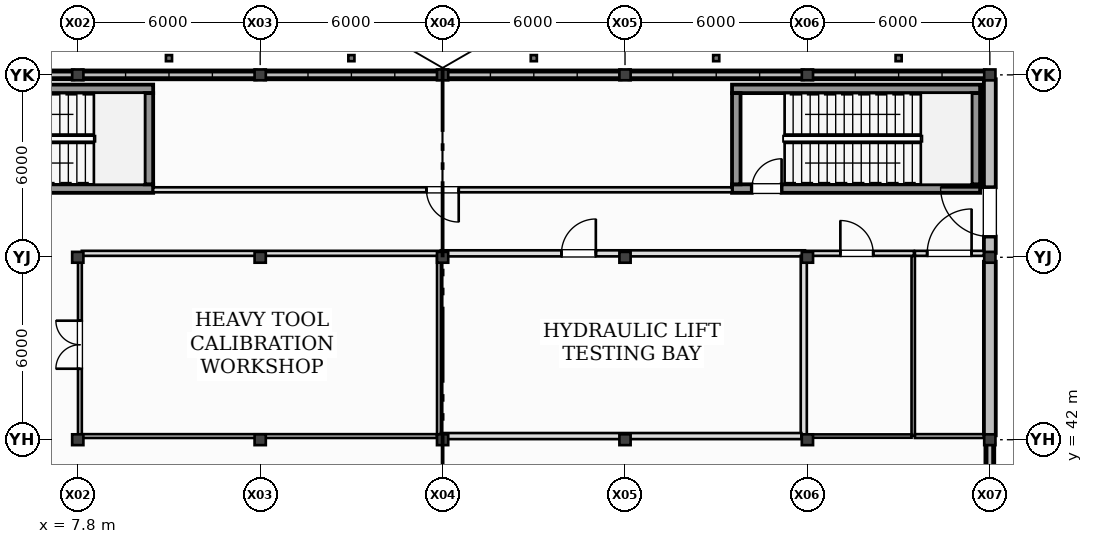
"""IFC4 building model, lengths in metres.
Left out: names, types, materials, properties, quantities, classifications, styles, units other than length and angle.
Written with IfcOpenShell. Run it as: python <this file> out.ifc"""

import sys

from ifc_helpers import new_model, si_unit, direction, frame, frame_2d, origin, origin_2d, place, context, subcontext, project, spatial, rectangle, hollow_rectangle, i_section, extrude, element, fill, save


model = new_model("IFC4")
c1 = context("Model", 3, precision=1e-05, world=origin(), true_north=direction((0.0, 1.0)))
c2 = subcontext(c1, "Body", "Model", "MODEL_VIEW")
j1 = project(units=[si_unit("LENGTHUNIT", "METRE"), si_unit("PLANEANGLEUNIT", "RADIAN")], contexts=[c1])
p1 = place(None, origin())
s1 = spatial("IfcSite", under=j1, at=p1, CompositionType="ELEMENT")
p2 = place(p1, origin())
s2 = spatial("IfcBuilding", under=s1, at=p2, CompositionType="ELEMENT")
p3 = place(p2, origin())
s3 = spatial("IfcBuildingStorey", under=s2, at=p3, CompositionType="ELEMENT", Elevation=0.0)
for number, where, z_axis, x_axis in (
    (1, (7.8, 42.0, -0.41), (0.0, 0.0, 1.0), (1.0, 0.0, 0.0)),
    (2, (7.8, 48.0, -0.41), (0.0, 0.0, 1.0), (1.0, 0.0, 0.0)),
    (3, (7.8, 54.0, -0.41), (0.0, 0.0, 1.0), (1.0, 0.0, 0.0)),
    (4, (13.8, 42.0, -0.41), (0.0, 0.0, 1.0), (1.0, 0.0, 0.0)),
    (5, (13.8, 48.0, -0.41), (0.0, 0.0, 1.0), (1.0, 0.0, 0.0)),
    (6, (13.8, 54.0, -0.41), (0.0, 0.0, 1.0), (1.0, 0.0, 0.0)),
    (7, (19.8, 42.0, -0.41), (0.0, 0.0, 1.0), (1.0, 0.0, 0.0)),
    (8, (19.8, 48.0, -0.41), (0.0, 0.0, 1.0), (1.0, 0.0, 0.0)),
    (9, (19.8, 54.0, -0.41), (0.0, 0.0, 1.0), (1.0, 0.0, 0.0)),
    (10, (25.8, 42.0, -0.41), (0.0, 0.0, 1.0), (1.0, 0.0, 0.0)),
    (11, (25.8, 48.0, -0.41), (0.0, 0.0, 1.0), (1.0, 0.0, 0.0)),
    (12, (25.8, 54.0, -0.41), (0.0, 0.0, 1.0), (1.0, 0.0, 0.0)),
    (13, (31.8, 42.0, -0.41), (0.0, 0.0, 1.0), (1.0, 0.0, 0.0)),
    (14, (31.8, 48.0, -0.41), (0.0, 0.0, 1.0), (1.0, 0.0, 0.0)),
    (15, (31.8, 54.0, -0.41), (0.0, 0.0, 1.0), (1.0, 0.0, 0.0)),
    (16, (37.8, 42.0, -0.41), (0.0, 0.0, 1.0), (1.0, 0.0, 0.0)),
    (17, (37.8, 48.0, -0.41), (0.0, 0.0, 1.0), (1.0, 0.0, 0.0)),
    (18, (37.8, 54.0, -0.41), (0.0, 0.0, 1.0), (1.0, 0.0, 0.0)),
):
    element("IfcColumn", number, at=place(p3, frame(where, z_axis=z_axis, x_axis=x_axis)), inside=s3, PredefinedType="COLUMN", context=c2, shape_type="SweptSolid", body=[
        extrude(i_section(OverallWidth=0.369, OverallDepth=0.356, WebThickness=0.011, FlangeThickness=0.018, at=origin_2d()), origin(), (0.0, 0.0, 1.0), 6.41),
    ])
for number, where, z_axis, x_axis in (
    (19, (10.8, 54.55, -0.35), (0.0, 0.0, 1.0), (1.0, 0.0, 0.0)),
    (20, (16.8, 54.55, -0.35), (0.0, 0.0, 1.0), (1.0, 0.0, 0.0)),
    (21, (22.8, 54.55, -0.35), (0.0, 0.0, 1.0), (1.0, 0.0, 0.0)),
    (22, (28.8, 54.55, -0.35), (0.0, 0.0, 1.0), (1.0, 0.0, 0.0)),
    (23, (34.8, 54.55, -0.35), (0.0, 0.0, 1.0), (1.0, 0.0, 0.0)),
):
    element("IfcColumn", number, at=place(p3, frame(where, z_axis=z_axis, x_axis=x_axis)), inside=s3, PredefinedType="PILASTER", context=c2, shape_type="SweptSolid", body=[
        extrude(hollow_rectangle(XDim=0.2, YDim=0.2, WallThickness=0.01, at=origin_2d()), origin(), (0.0, 0.0, 1.0), 6.35),
    ])
p4 = place(p3, frame((7.655, 54.0, 0.0), z_axis=(0.0, 0.0, 1.0), x_axis=(-1.0, 0.0, 0.0)))
e24 = element("IfcWall", 24, at=p4, inside=s3, PredefinedType="STANDARD", context=c2, shape_type="SweptSolid", body=[
    extrude(rectangle(XDim=5.71, YDim=0.29, at=frame_2d((2.855, 0.0))), origin(), (0.0, 0.0, 1.0), 0.92),
])
p5 = place(p3, frame((13.655, 54.0, 0.0), z_axis=(0.0, 0.0, 1.0), x_axis=(-1.0, 0.0, 0.0)))
e25 = element("IfcWall", 25, at=p5, inside=s3, PredefinedType="STANDARD", context=c2, shape_type="SweptSolid", body=[
    extrude(rectangle(XDim=5.71, YDim=0.29, at=frame_2d((2.855, 0.0))), origin(), (0.0, 0.0, 1.0), 0.32),
])
p6 = place(p3, frame((19.655, 54.0, 0.0), z_axis=(0.0, 0.0, 1.0), x_axis=(-1.0, 0.0, 0.0)))
e26 = element("IfcWall", 26, at=p6, inside=s3, PredefinedType="STANDARD", context=c2, shape_type="SweptSolid", body=[
    extrude(rectangle(XDim=5.71, YDim=0.29, at=frame_2d((2.855, 0.0))), origin(), (0.0, 0.0, 1.0), 0.44),
])
p7 = place(p3, frame((25.655, 54.0, 0.0), z_axis=(0.0, 0.0, 1.0), x_axis=(-1.0, 0.0, 0.0)))
e27 = element("IfcWall", 27, at=p7, inside=s3, PredefinedType="STANDARD", context=c2, shape_type="SweptSolid", body=[
    extrude(rectangle(XDim=5.71, YDim=0.29, at=frame_2d((2.855, 0.0))), origin(), (0.0, 0.0, 1.0), 0.56),
])
p8 = place(p3, frame((31.655, 54.0, 0.0), z_axis=(0.0, 0.0, 1.0), x_axis=(-1.0, 0.0, 0.0)))
e28 = element("IfcWall", 28, at=p8, inside=s3, PredefinedType="STANDARD", context=c2, shape_type="SweptSolid", body=[
    extrude(rectangle(XDim=5.71, YDim=0.29, at=frame_2d((2.855, 0.0))), origin(), (0.0, 0.0, 1.0), 0.68),
])
p9 = place(p3, frame((37.655, 54.0, 0.0), z_axis=(0.0, 0.0, 1.0), x_axis=(-1.0, 0.0, 0.0)))
e29 = element("IfcWall", 29, at=p9, inside=s3, PredefinedType="STANDARD", context=c2, shape_type="SweptSolid", body=[
    extrude(rectangle(XDim=5.71, YDim=0.29, at=frame_2d((2.855, 0.0))), origin(), (0.0, 0.0, 1.0), 0.8),
])
p10 = place(p3, frame((37.8, 36.145, 0.0), z_axis=(0.0, 0.0, 1.0), x_axis=(0.0, 1.0, 0.0)))
e30 = element("IfcWall", 30, at=p10, inside=s3, PredefinedType="STANDARD", context=c2, shape_type="SweptSolid", body=[
    extrude(rectangle(XDim=5.71, YDim=0.29, at=frame_2d((2.855, 0.0))), origin(), (0.0, 0.0, 1.0), 0.56),
])
p11 = place(p3, frame((37.8, 42.145, 0.0), z_axis=(0.0, 0.0, 1.0), x_axis=(0.0, 1.0, 0.0)))
e31 = element("IfcWall", 31, at=p11, inside=s3, PredefinedType="STANDARD", context=c2, shape_type="SweptSolid", body=[
    extrude(rectangle(XDim=5.71, YDim=0.39, at=frame_2d((2.855, 0.0))), origin(), (0.0, 0.0, 1.0), 5.044),
])
p12 = place(p3, frame((37.8, 48.145, 0.0), z_axis=(0.0, 0.0, 1.0), x_axis=(0.0, 1.0, 0.0)))
e32 = element("IfcWall", 32, at=p12, inside=s3, PredefinedType="STANDARD", context=c2, shape_type="SweptSolid", body=[
    extrude(rectangle(XDim=5.71, YDim=0.39, at=frame_2d((2.855, 0.0))), origin(), (0.0, 0.0, 1.0), 5.044),
])
p13 = place(p12, frame((0.537, 0.0, 0.0)))
e33 = element("IfcOpeningElement", 33, at=p13, cuts=e32, PredefinedType="OPENING", context=c2, shape_type="SweptSolid", body=[
    extrude(rectangle(XDim=1.62, YDim=2.2, at=frame_2d((0.81, 1.1))), frame((0.0, 0.205, 0.0), z_axis=(0.0, -1.0, 0.0), x_axis=(1.0, 0.0, 0.0)), (0.0, 0.0, 1.0), 0.41),
])
p14 = place(p3, frame((2.12, 50.26, 0.0), z_axis=(0.0, 0.0, 1.0), x_axis=(1.0, 0.0, 0.0)))
e34 = element("IfcWall", 34, at=p14, inside=s3, PredefinedType="SHEAR", context=c2, shape_type="SweptSolid", body=[
    extrude(rectangle(XDim=8.16, YDim=0.28, at=frame_2d((4.08, 0.0))), origin(), (0.0, 0.0, 1.0), 6.0),
])
p15 = place(p14, frame((0.65, 0.0, 0.0)))
e35 = element("IfcOpeningElement", 35, at=p15, cuts=e34, PredefinedType="OPENING", context=c2, shape_type="SweptSolid", body=[
    extrude(rectangle(XDim=0.98, YDim=2.15, at=frame_2d((0.49, 1.075))), frame((0.0, 0.15, 0.0), z_axis=(0.0, -1.0, 0.0), x_axis=(1.0, 0.0, 0.0)), (0.0, 0.0, 1.0), 0.3),
])
p16 = place(p3, frame((10.28, 53.54, 0.0), z_axis=(0.0, 0.0, 1.0), x_axis=(-1.0, 0.0, 0.0)))
e36 = element("IfcWall", 36, at=p16, inside=s3, PredefinedType="SHEAR", context=c2, shape_type="SweptSolid", body=[
    extrude(rectangle(XDim=8.16, YDim=0.28, at=frame_2d((4.08, 0.0))), origin(), (0.0, 0.0, 1.0), 6.0),
])
p17 = place(p3, frame((10.14, 50.4, 0.0), z_axis=(0.0, 0.0, 1.0), x_axis=(0.0, 1.0, 0.0)))
e37 = element("IfcWall", 37, at=p17, inside=s3, PredefinedType="SHEAR", context=c2, shape_type="SweptSolid", body=[
    extrude(rectangle(XDim=3.0, YDim=0.28, at=frame_2d((1.5, 0.0))), origin(), (0.0, 0.0, 1.0), 6.0),
])
p18 = place(p3, frame((29.32, 50.26, 0.0), z_axis=(0.0, 0.0, 1.0), x_axis=(1.0, 0.0, 0.0)))
e38 = element("IfcWall", 38, at=p18, inside=s3, PredefinedType="SHEAR", context=c2, shape_type="SweptSolid", body=[
    extrude(rectangle(XDim=8.16, YDim=0.28, at=frame_2d((4.08, 0.0))), origin(), (0.0, 0.0, 1.0), 6.0),
])
p19 = place(p18, frame((0.65, 0.0, 0.0)))
e39 = element("IfcOpeningElement", 39, at=p19, cuts=e38, PredefinedType="OPENING", context=c2, shape_type="SweptSolid", body=[
    extrude(rectangle(XDim=0.98, YDim=2.15, at=frame_2d((0.49, 1.075))), frame((0.0, 0.15, 0.0), z_axis=(0.0, -1.0, 0.0), x_axis=(1.0, 0.0, 0.0)), (0.0, 0.0, 1.0), 0.3),
])
p20 = place(p3, frame((37.48, 53.54, 0.0), z_axis=(0.0, 0.0, 1.0), x_axis=(-1.0, 0.0, 0.0)))
e40 = element("IfcWall", 40, at=p20, inside=s3, PredefinedType="SHEAR", context=c2, shape_type="SweptSolid", body=[
    extrude(rectangle(XDim=8.16, YDim=0.28, at=frame_2d((4.08, 0.0))), origin(), (0.0, 0.0, 1.0), 6.0),
])
for number, where, z_axis, x_axis in (
    (41, (29.46, 53.4, 0.0), (0.0, 0.0, 1.0), (0.0, -1.0, 0.0)),
    (42, (37.34, 50.4, 0.0), (0.0, 0.0, 1.0), (0.0, 1.0, 0.0)),
):
    element("IfcWall", number, at=place(p3, frame(where, z_axis=z_axis, x_axis=x_axis)), inside=s3, PredefinedType="SHEAR", context=c2, shape_type="SweptSolid", body=[
        extrude(rectangle(XDim=3.0, YDim=0.28, at=frame_2d((1.5, 0.0))), origin(), (0.0, 0.0, 1.0), 6.0),
    ])
p21 = place(p3, frame((7.87, 42.117, 0.0), z_axis=(0.0, 0.0, 1.0), x_axis=(0.0, 1.0, 0.0)))
e43 = element("IfcWall", 43, at=p21, inside=s3, PredefinedType="PARTITIONING", context=c2, shape_type="SweptSolid", body=[
    extrude(rectangle(XDim=6.015, YDim=0.125, at=frame_2d((3.008, 0.0))), origin(), (0.0, 0.0, 1.0), 5.044),
])
p22 = place(p21, frame((2.218, 0.0, 0.0)))
e44 = element("IfcOpeningElement", 44, at=p22, cuts=e43, PredefinedType="OPENING", context=c2, shape_type="SweptSolid", body=[
    extrude(rectangle(XDim=1.58, YDim=2.2, at=frame_2d((0.79, 1.1))), frame((0.0, 0.073, 0.0), z_axis=(0.0, -1.0, 0.0), x_axis=(1.0, 0.0, 0.0)), (0.0, 0.0, 1.0), 0.145),
])
p23 = place(p3, frame((7.933, 48.13, 0.0), z_axis=(0.0, 0.0, 1.0), x_axis=(1.0, 0.0, 0.0)))
e45 = element("IfcWall", 45, at=p23, inside=s3, PredefinedType="PARTITIONING", context=c2, shape_type="SweptSolid", body=[
    extrude(rectangle(XDim=11.77, YDim=0.165, at=frame_2d((5.885, 0.0))), origin(), (0.0, 0.0, 1.0), 5.113),
])
p24 = place(p3, frame((19.68, 48.05, 0.0), z_axis=(0.0, 0.0, 1.0), x_axis=(0.0, -1.0, 0.0)))
e46 = element("IfcWall", 46, at=p24, inside=s3, PredefinedType="PARTITIONING", context=c2, shape_type="SweptSolid", body=[
    extrude(rectangle(XDim=5.933, YDim=0.125, at=frame_2d((2.966, 0.0))), origin(), (0.0, 0.0, 1.0), 5.044),
])
p25 = place(p3, frame((19.617, 42.12, 0.0), z_axis=(0.0, 0.0, 1.0), x_axis=(-1.0, 0.0, 0.0)))
e47 = element("IfcWall", 47, at=p25, inside=s3, PredefinedType="PARTITIONING", context=c2, shape_type="SweptSolid", body=[
    extrude(rectangle(XDim=11.685, YDim=0.125, at=frame_2d((5.842, 0.0))), origin(), (0.0, 0.0, 1.0), 5.113),
])
p26 = place(p3, frame((19.742, 48.13, 0.0), z_axis=(0.0, 0.0, 1.0), x_axis=(1.0, 0.0, 0.0)))
e48 = element("IfcWall", 48, at=p26, inside=s3, PredefinedType="PARTITIONING", context=c2, shape_type="SweptSolid", body=[
    extrude(rectangle(XDim=11.978, YDim=0.2, at=frame_2d((5.989, 0.0))), origin(), (0.0, 0.0, 1.0), 5.113),
])
p27 = place(p26, frame((3.968, 0.0, 0.0)))
e49 = element("IfcOpeningElement", 49, at=p27, cuts=e48, PredefinedType="OPENING", context=c2, shape_type="SweptSolid", body=[
    extrude(rectangle(XDim=1.13, YDim=2.18, at=frame_2d((0.565, 1.09))), frame((0.0, 0.11, 0.0), z_axis=(0.0, -1.0, 0.0), x_axis=(1.0, 0.0, 0.0)), (0.0, 0.0, 1.0), 0.22),
])
p28 = place(p3, frame((31.68, 48.05, 0.0), z_axis=(0.0, 0.0, 1.0), x_axis=(0.0, -1.0, 0.0)))
e50 = element("IfcWall", 50, at=p28, inside=s3, PredefinedType="PARTITIONING", context=c2, shape_type="SweptSolid", body=[
    extrude(rectangle(XDim=5.97, YDim=0.2, at=frame_2d((2.985, 0.0))), origin(), (0.0, 0.0, 1.0), 5.044),
])
p29 = place(p3, frame((31.6, 42.12, 0.0), z_axis=(0.0, 0.0, 1.0), x_axis=(-1.0, 0.0, 0.0)))
e51 = element("IfcWall", 51, at=p29, inside=s3, PredefinedType="PARTITIONING", context=c2, shape_type="SweptSolid", body=[
    extrude(rectangle(XDim=11.858, YDim=0.2, at=frame_2d((5.929, 0.0))), origin(), (0.0, 0.0, 1.0), 5.113),
])
p30 = place(p3, frame((31.78, 48.13, 0.0), z_axis=(0.0, 0.0, 1.0), x_axis=(1.0, 0.0, 0.0)))
e52 = element("IfcWall", 52, at=p30, inside=s3, PredefinedType="PARTITIONING", context=c2, shape_type="SweptSolid", body=[
    extrude(rectangle(XDim=3.522, YDim=0.165, at=frame_2d((1.761, 0.0))), origin(), (0.0, 0.0, 1.0), 5.113),
])
p31 = place(p30, frame((1.103, 0.0, 0.0)))
e53 = element("IfcOpeningElement", 53, at=p31, cuts=e52, PredefinedType="OPENING", context=c2, shape_type="SweptSolid", body=[
    extrude(rectangle(XDim=1.08, YDim=2.14, at=frame_2d((0.54, 1.07))), frame((0.0, 0.093, 0.0), z_axis=(0.0, -1.0, 0.0), x_axis=(1.0, 0.0, 0.0)), (0.0, 0.0, 1.0), 0.185),
])
p32 = place(p3, frame((35.28, 48.05, 0.0), z_axis=(0.0, 0.0, 1.0), x_axis=(0.0, -1.0, 0.0)))
e54 = element("IfcWall", 54, at=p32, inside=s3, PredefinedType="PARTITIONING", context=c2, shape_type="SweptSolid", body=[
    extrude(rectangle(XDim=5.925, YDim=0.11, at=frame_2d((2.962, 0.0))), origin(), (0.0, 0.0, 1.0), 5.68),
])
p33 = place(p3, frame((35.225, 42.12, 0.0), z_axis=(0.0, 0.0, 1.0), x_axis=(-1.0, 0.0, 0.0)))
e55 = element("IfcWall", 55, at=p33, inside=s3, PredefinedType="PARTITIONING", context=c2, shape_type="SweptSolid", body=[
    extrude(rectangle(XDim=3.445, YDim=0.11, at=frame_2d((1.723, 0.0))), origin(), (0.0, 0.0, 1.0), 5.113),
])
p34 = place(p3, frame((35.335, 48.13, 0.0), z_axis=(0.0, 0.0, 1.0), x_axis=(1.0, 0.0, 0.0)))
e56 = element("IfcWall", 56, at=p34, inside=s3, PredefinedType="PARTITIONING", context=c2, shape_type="SweptSolid", body=[
    extrude(rectangle(XDim=2.27, YDim=0.165, at=frame_2d((1.135, 0.0))), origin(), (0.0, 0.0, 1.0), 5.113),
])
p35 = place(p34, frame((0.405, 0.0, 0.0)))
e57 = element("IfcOpeningElement", 57, at=p35, cuts=e56, PredefinedType="OPENING", context=c2, shape_type="SweptSolid", body=[
    extrude(rectangle(XDim=1.46, YDim=2.3, at=frame_2d((0.73, 1.15))), frame((0.0, 0.093, 0.0), z_axis=(0.0, -1.0, 0.0), x_axis=(1.0, 0.0, 0.0)), (0.0, 0.0, 1.0), 0.185),
])
p36 = place(p3, frame((37.605, 42.12, 0.0), z_axis=(0.0, 0.0, 1.0), x_axis=(-1.0, 0.0, 0.0)))
e58 = element("IfcWall", 58, at=p36, inside=s3, PredefinedType="PARTITIONING", context=c2, shape_type="SweptSolid", body=[
    extrude(rectangle(XDim=2.27, YDim=0.125, at=frame_2d((1.135, 0.0))), origin(), (0.0, 0.0, 1.0), 5.113),
])
p37 = place(p3, frame((29.32, 50.22, 0.0), z_axis=(0.0, 0.0, 1.0), x_axis=(-1.0, 0.0, 0.0)))
e59 = element("IfcWall", 59, at=p37, inside=s3, PredefinedType="PARTITIONING", context=c2, shape_type="SweptSolid", body=[
    extrude(rectangle(XDim=19.04, YDim=0.165, at=frame_2d((9.52, 0.0))), origin(), (0.0, 0.0, 1.0), 5.68),
])
p38 = place(p37, frame((8.99, 0.0, 0.0)))
e60 = element("IfcOpeningElement", 60, at=p38, cuts=e59, PredefinedType="OPENING", context=c2, shape_type="SweptSolid", body=[
    extrude(rectangle(XDim=1.06, YDim=2.25, at=frame_2d((0.53, 1.125))), frame((0.0, 0.093, 0.0), z_axis=(0.0, -1.0, 0.0), x_axis=(1.0, 0.0, 0.0)), (0.0, 0.0, 1.0), 0.185),
])
p39 = place(p13, frame((1.62, 0.0, 0.0), z_axis=(0.0, 0.0, 1.0), x_axis=(-1.0, 0.0, 0.0)))
e61 = element("IfcDoor", 61, at=p39, inside=s3, OperationType="SINGLE_SWING_RIGHT", PredefinedType="DOOR", context=c2, shape_type="SweptSolid", body=[
    extrude(rectangle(XDim=1.62, YDim=2.2, at=frame_2d((0.81, 1.1))), frame((0.0, 0.025, 0.0), z_axis=(0.0, -1.0, 0.0), x_axis=(1.0, 0.0, 0.0)), (0.0, 0.0, 1.0), 0.05),
])
fill(e33, e61)
p40 = place(p19, origin())
e62 = element("IfcDoor", 62, at=p40, inside=s3, OperationType="SINGLE_SWING_RIGHT", PredefinedType="DOOR", context=c2, shape_type="SweptSolid", body=[
    extrude(rectangle(XDim=0.98, YDim=2.15, at=frame_2d((0.49, 1.075))), frame((0.0, 0.025, 0.0), z_axis=(0.0, -1.0, 0.0), x_axis=(1.0, 0.0, 0.0)), (0.0, 0.0, 1.0), 0.05),
])
fill(e39, e62)
p41 = place(p22, frame((1.58, 0.0, 0.0), z_axis=(0.0, 0.0, 1.0), x_axis=(-1.0, 0.0, 0.0)))
e63 = element("IfcDoor", 63, at=p41, inside=s3, OperationType="DOUBLE_DOOR_SINGLE_SWING", PredefinedType="DOOR", context=c2, shape_type="SweptSolid", body=[
    extrude(rectangle(XDim=1.58, YDim=2.2, at=frame_2d((0.79, 1.1))), frame((0.0, 0.025, 0.0), z_axis=(0.0, -1.0, 0.0), x_axis=(1.0, 0.0, 0.0)), (0.0, 0.0, 1.0), 0.05),
])
fill(e44, e63)
p42 = place(p27, frame((1.13, 0.0, 0.0), z_axis=(0.0, 0.0, 1.0), x_axis=(-1.0, 0.0, 0.0)))
e64 = element("IfcDoor", 64, at=p42, inside=s3, OperationType="SINGLE_SWING_RIGHT", PredefinedType="DOOR", context=c2, shape_type="SweptSolid", body=[
    extrude(rectangle(XDim=1.13, YDim=2.18, at=frame_2d((0.565, 1.09))), frame((0.0, 0.025, 0.0), z_axis=(0.0, -1.0, 0.0), x_axis=(1.0, 0.0, 0.0)), (0.0, 0.0, 1.0), 0.05),
])
fill(e49, e64)
p43 = place(p31, frame((1.08, 0.0, 0.0), z_axis=(0.0, 0.0, 1.0), x_axis=(-1.0, 0.0, 0.0)))
e65 = element("IfcDoor", 65, at=p43, inside=s3, OperationType="SINGLE_SWING_LEFT", PredefinedType="DOOR", context=c2, shape_type="SweptSolid", body=[
    extrude(rectangle(XDim=1.08, YDim=2.14, at=frame_2d((0.54, 1.07))), frame((0.0, 0.025, 0.0), z_axis=(0.0, -1.0, 0.0), x_axis=(1.0, 0.0, 0.0)), (0.0, 0.0, 1.0), 0.05),
])
fill(e53, e65)
p44 = place(p35, frame((1.46, 0.0, 0.0), z_axis=(0.0, 0.0, 1.0), x_axis=(-1.0, 0.0, 0.0)))
e66 = element("IfcDoor", 66, at=p44, inside=s3, OperationType="SINGLE_SWING_RIGHT", PredefinedType="DOOR", context=c2, shape_type="SweptSolid", body=[
    extrude(rectangle(XDim=1.46, YDim=2.3, at=frame_2d((0.73, 1.15))), frame((0.0, 0.025, 0.0), z_axis=(0.0, -1.0, 0.0), x_axis=(1.0, 0.0, 0.0)), (0.0, 0.0, 1.0), 0.05),
])
fill(e57, e66)
p45 = place(p38, frame((1.06, 0.0, 0.0), z_axis=(0.0, 0.0, 1.0), x_axis=(-1.0, 0.0, 0.0)))
e67 = element("IfcDoor", 67, at=p45, inside=s3, OperationType="SINGLE_SWING_LEFT", PredefinedType="DOOR", context=c2, shape_type="SweptSolid", body=[
    extrude(rectangle(XDim=1.06, YDim=2.25, at=frame_2d((0.53, 1.125))), frame((0.0, 0.025, 0.0), z_axis=(0.0, -1.0, 0.0), x_axis=(1.0, 0.0, 0.0)), (0.0, 0.0, 1.0), 0.05),
])
fill(e60, e67)
save(model, sys.argv[1])
